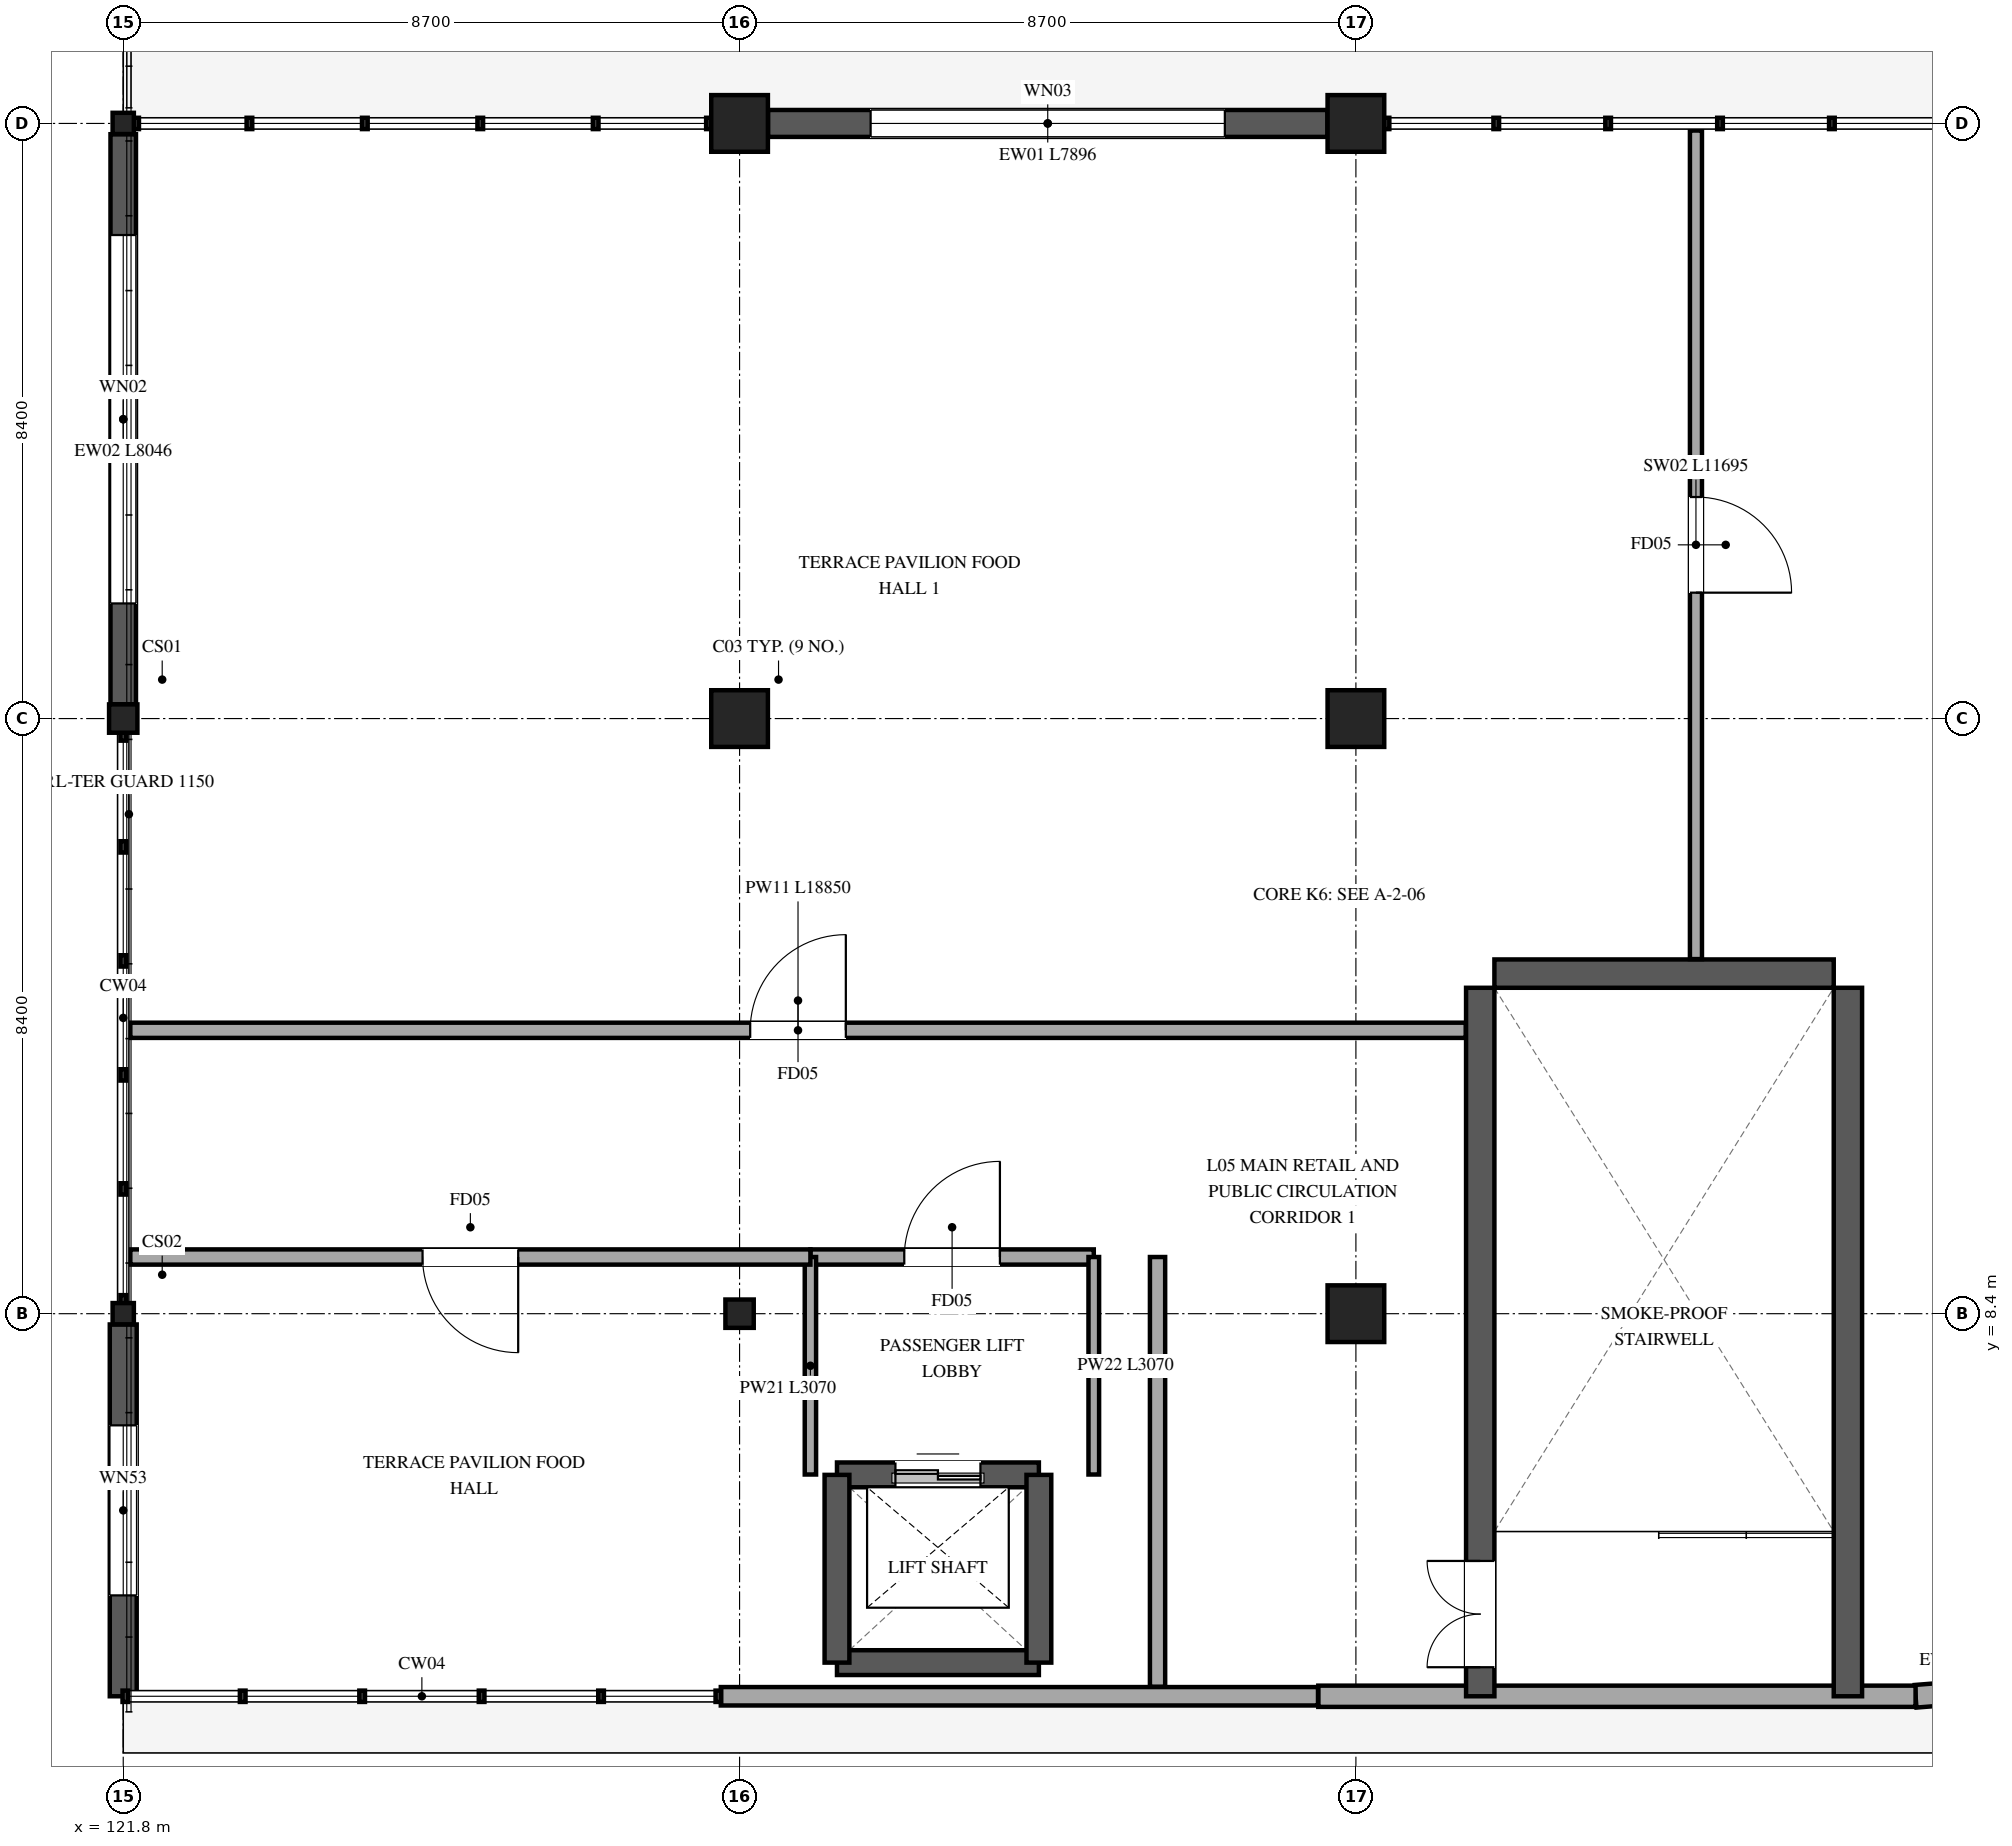
"""IFC4 building model, lengths in metres.
Left out: names, types, materials, properties, quantities, classifications, styles, units other than length and angle.
Written with IfcOpenShell. Run it as: python <this file> out.ifc"""

import sys

from ifc_helpers import new_model, si_unit, direction, frame, frame_2d, origin, origin_2d, place, context, subcontext, project, spatial, rectangle, i_section, extrude, element, fill, save


model = new_model("IFC4")
c1 = context("Model", 3, precision=1e-05, world=origin(), true_north=direction((0.0, 1.0)))
c2 = subcontext(c1, "Body", "Model", "MODEL_VIEW")
j1 = project(units=[si_unit("LENGTHUNIT", "METRE"), si_unit("PLANEANGLEUNIT", "RADIAN")], contexts=[c1])
p1 = place(None, origin())
s1 = spatial("IfcSite", under=j1, at=p1, CompositionType="ELEMENT")
p2 = place(p1, origin())
s2 = spatial("IfcBuilding", under=s1, at=p2, CompositionType="ELEMENT")
p3 = place(p2, frame((0.0, 0.0, 21.6)))
s3 = spatial("IfcBuildingStorey", under=s2, at=p3, CompositionType="ELEMENT", Elevation=21.6)
p4 = place(p3, frame((121.8, 8.4, 0.0), z_axis=(0.0, 0.0, 1.0), x_axis=(1.0, 0.0, 0.0)))
e1 = element("IfcColumn", 1, at=p4, inside=s3, PredefinedType="PILASTER", context=c2, shape_type="SweptSolid", body=[
    extrude(i_section(OverallWidth=0.3, OverallDepth=0.3, WebThickness=0.01, FlangeThickness=0.015, FilletRadius=0.018, at=origin_2d()), origin(), (0.0, 0.0, 1.0), 5.1),
])
p5 = place(p3, frame((121.8, 16.8, 0.0), z_axis=(0.0, 0.0, 1.0), x_axis=(1.0, 0.0, 0.0)))
e2 = element("IfcColumn", 2, at=p5, inside=s3, PredefinedType="COLUMN", context=c2, shape_type="SweptSolid", body=[
    extrude(i_section(OverallWidth=0.4, OverallDepth=0.4, WebThickness=0.013, FlangeThickness=0.021, FilletRadius=0.022, at=origin_2d()), origin(), (0.0, 0.0, 1.0), 5.1),
])
p6 = place(p3, frame((121.8, 25.2, 0.0), z_axis=(0.0, 0.0, 1.0), x_axis=(1.0, 0.0, 0.0)))
e3 = element("IfcColumn", 3, at=p6, inside=s3, PredefinedType="PILASTER", context=c2, shape_type="SweptSolid", body=[
    extrude(i_section(OverallWidth=0.3, OverallDepth=0.3, WebThickness=0.01, FlangeThickness=0.015, FilletRadius=0.018, at=origin_2d()), origin(), (0.0, 0.0, 1.0), 5.1),
])
p7 = place(p3, frame((130.5, 8.4, 0.0), z_axis=(0.0, 0.0, 1.0), x_axis=(1.0, 0.0, 0.0)))
e4 = element("IfcColumn", 4, at=p7, inside=s3, PredefinedType="COLUMN", context=c2, shape_type="SweptSolid", body=[
    extrude(i_section(OverallWidth=0.4, OverallDepth=0.4, WebThickness=0.013, FlangeThickness=0.021, FilletRadius=0.022, at=origin_2d()), origin(), (0.0, 0.0, 1.0), 5.1),
])
for number, where, z_axis, x_axis in (
    (5, (130.5, 16.8, 0.0), (0.0, 0.0, 1.0), (1.0, 0.0, 0.0)),
    (6, (130.5, 25.2, 0.0), (0.0, 0.0, 1.0), (1.0, 0.0, 0.0)),
    (7, (139.2, 8.4, 0.0), (0.0, 0.0, 1.0), (1.0, 0.0, 0.0)),
    (8, (139.2, 16.8, 0.0), (0.0, 0.0, 1.0), (1.0, 0.0, 0.0)),
    (9, (139.2, 25.2, 0.0), (0.0, 0.0, 1.0), (1.0, 0.0, 0.0)),
):
    element("IfcColumn", number, at=place(p3, frame(where, z_axis=z_axis, x_axis=x_axis)), inside=s3, PredefinedType="COLUMN", context=c2, shape_type="SweptSolid", body=[
        extrude(rectangle(XDim=0.8, YDim=0.8, at=origin_2d()), origin(), (0.0, 0.0, 1.0), 5.1),
    ])
p8 = place(p3, frame((148.586, 3.117, 0.0), z_axis=(0.0, 0.0, 1.0), x_axis=(-0.996917059385, -0.078462581572, 0.0)))
e10 = element("IfcWall", 10, at=p8, inside=s3, PredefinedType="STANDARD", context=c2, shape_type="SweptSolid", body=[
    extrude(rectangle(XDim=1.49, YDim=0.32, at=frame_2d((0.745, 0.0))), origin(), (0.0, 0.0, 1.0), 4.79),
])
p9 = place(p3, frame((147.1, 3.0, 0.0), z_axis=(0.0, 0.0, 1.0), x_axis=(-1.0, 0.0, 0.0)))
e11 = element("IfcWall", 11, at=p9, inside=s3, PredefinedType="STANDARD", context=c2, shape_type="SweptSolid", body=[
    extrude(rectangle(XDim=8.431, YDim=0.3, at=frame_2d((4.216, 0.0))), origin(), (0.0, 0.0, 1.0), 4.79),
])
p10 = place(p3, frame((138.665, 3.0, 0.0), z_axis=(0.0, 0.0, 1.0), x_axis=(-1.0, 0.0, 0.0)))
e12 = element("IfcWall", 12, at=p10, inside=s3, PredefinedType="STANDARD", context=c2, shape_type="SweptSolid", body=[
    extrude(rectangle(XDim=8.43, YDim=0.26, at=frame_2d((4.215, 0.0))), origin(), (0.0, 0.0, 1.0), 4.79),
])
p11 = place(p3, frame((121.8, 3.0, 0.0), z_axis=(0.0, 0.0, 1.0), x_axis=(0.0, 1.0, 0.0)))
e13 = element("IfcWall", 13, at=p11, inside=s3, PredefinedType="STANDARD", context=c2, shape_type="SweptSolid", body=[
    extrude(rectangle(XDim=5.248, YDim=0.38, at=frame_2d((2.624, 0.0))), origin(), (0.0, 0.0, 1.0), 4.79),
])
p12 = place(p11, frame((1.424, 0.0, 0.85)))
e14 = element("IfcOpeningElement", 14, at=p12, cuts=e13, PredefinedType="OPENING", context=c2, shape_type="SweptSolid", body=[
    extrude(rectangle(XDim=2.4, YDim=2.25, at=frame_2d((1.2, 1.125))), frame((0.0, 0.2, 0.0), z_axis=(0.0, -1.0, 0.0), x_axis=(1.0, 0.0, 0.0)), (0.0, 0.0, 1.0), 0.4),
])
p13 = place(p3, frame((121.8, 17.002, 0.0), z_axis=(0.0, 0.0, 1.0), x_axis=(0.0, 1.0, 0.0)))
e15 = element("IfcWall", 15, at=p13, inside=s3, PredefinedType="STANDARD", context=c2, shape_type="SweptSolid", body=[
    extrude(rectangle(XDim=8.046, YDim=0.36, at=frame_2d((4.023, 0.0))), origin(), (0.0, 0.0, 1.0), 4.79),
])
p14 = place(p13, frame((1.423, 0.0, 0.85)))
e16 = element("IfcOpeningElement", 16, at=p14, cuts=e15, PredefinedType="OPENING", context=c2, shape_type="SweptSolid", body=[
    extrude(rectangle(XDim=5.2, YDim=2.75, at=frame_2d((2.6, 1.375))), frame((0.0, 0.19, 0.0), z_axis=(0.0, -1.0, 0.0), x_axis=(1.0, 0.0, 0.0)), (0.0, 0.0, 1.0), 0.38),
])
p15 = place(p3, frame((130.902, 25.2, 0.0), z_axis=(0.0, 0.0, 1.0), x_axis=(1.0, 0.0, 0.0)))
e17 = element("IfcWall", 17, at=p15, inside=s3, PredefinedType="STANDARD", context=c2, shape_type="SweptSolid", body=[
    extrude(rectangle(XDim=7.896, YDim=0.38, at=frame_2d((3.948, 0.0))), origin(), (0.0, 0.0, 1.0), 4.79),
])
p16 = place(p15, frame((1.448, 0.0, 0.85)))
e18 = element("IfcOpeningElement", 18, at=p16, cuts=e17, PredefinedType="OPENING", context=c2, shape_type="SweptSolid", body=[
    extrude(rectangle(XDim=5.0, YDim=2.65, at=frame_2d((2.5, 1.325))), frame((0.0, 0.2, 0.0), z_axis=(0.0, -1.0, 0.0), x_axis=(1.0, 0.0, 0.0)), (0.0, 0.0, 1.0), 0.4),
])
p17 = place(p3, frame((140.955, 3.0, 0.0), z_axis=(0.0, 0.0, 1.0), x_axis=(0.0, 1.0, 0.0)))
e19 = element("IfcWall", 19, at=p17, inside=s3, PredefinedType="SHEAR", context=c2, shape_type="SweptSolid", body=[
    extrude(rectangle(XDim=10.0, YDim=0.4, at=frame_2d((5.0, 0.0))), origin(), (0.0, 0.0, 1.0), 5.1),
])
p18 = place(p17, frame((0.41, 0.0, 0.0)))
e20 = element("IfcOpeningElement", 20, at=p18, cuts=e19, PredefinedType="OPENING", context=c2, shape_type="SweptSolid", body=[
    extrude(rectangle(XDim=1.5, YDim=2.2, at=frame_2d((0.75, 1.1))), frame((0.0, 0.21, 0.0), z_axis=(0.0, -1.0, 0.0), x_axis=(1.0, 0.0, 0.0)), (0.0, 0.0, 1.0), 0.42),
])
p19 = place(p3, frame((146.145, 13.0, 0.0), z_axis=(0.0, 0.0, 1.0), x_axis=(0.0, -1.0, 0.0)))
e21 = element("IfcWall", 21, at=p19, inside=s3, PredefinedType="SHEAR", context=c2, shape_type="SweptSolid", body=[
    extrude(rectangle(XDim=10.0, YDim=0.4, at=frame_2d((5.0, 0.0))), origin(), (0.0, 0.0, 1.0), 5.1),
])
p20 = place(p3, frame((141.155, 13.2, 0.0), z_axis=(0.0, 0.0, 1.0), x_axis=(1.0, 0.0, 0.0)))
e22 = element("IfcWall", 22, at=p20, inside=s3, PredefinedType="SHEAR", context=c2, shape_type="SweptSolid", body=[
    extrude(rectangle(XDim=4.79, YDim=0.4, at=frame_2d((2.395, 0.0))), origin(), (0.0, 0.0, 1.0), 5.1),
])
p21 = place(p3, frame((131.875, 6.125, 0.0), z_axis=(0.0, 0.0, 1.0), x_axis=(1.0, 0.0, 0.0)))
e23 = element("IfcWall", 23, at=p21, inside=s3, PredefinedType="SHEAR", context=c2, shape_type="SweptSolid", body=[
    extrude(rectangle(XDim=2.85, YDim=0.35, at=frame_2d((1.425, 0.0))), origin(), (0.0, 0.0, 1.0), 5.1),
])
p22 = place(p21, frame((0.825, 0.0, 0.0)))
e24 = element("IfcOpeningElement", 24, at=p22, cuts=e23, PredefinedType="OPENING", context=c2, shape_type="SweptSolid", body=[
    extrude(rectangle(XDim=1.2, YDim=2.2, at=frame_2d((0.6, 1.1))), frame((0.0, 0.185, 0.0), z_axis=(0.0, -1.0, 0.0), x_axis=(1.0, 0.0, 0.0)), (0.0, 0.0, 1.0), 0.37),
])
p23 = place(p3, frame((134.725, 3.475, 0.0), z_axis=(0.0, 0.0, 1.0), x_axis=(-1.0, 0.0, 0.0)))
e25 = element("IfcWall", 25, at=p23, inside=s3, PredefinedType="SHEAR", context=c2, shape_type="SweptSolid", body=[
    extrude(rectangle(XDim=2.85, YDim=0.35, at=frame_2d((1.425, 0.0))), origin(), (0.0, 0.0, 1.0), 5.1),
])
for number, where, z_axis, x_axis in (
    (26, (131.875, 3.475, 0.0), (0.0, 0.0, 1.0), (0.0, 1.0, 0.0)),
    (27, (134.725, 6.125, 0.0), (0.0, 0.0, 1.0), (0.0, -1.0, 0.0)),
):
    element("IfcWall", number, at=place(p3, frame(where, z_axis=z_axis, x_axis=x_axis)), inside=s3, PredefinedType="SHEAR", context=c2, shape_type="SweptSolid", body=[
        extrude(rectangle(XDim=2.65, YDim=0.35, at=frame_2d((1.325, 0.0))), origin(), (0.0, 0.0, 1.0), 5.1),
    ])
p24 = place(p3, frame((131.5, 9.2, 0.0), z_axis=(0.0, 0.0, 1.0), x_axis=(1.0, 0.0, 0.0)))
e28 = element("IfcWall", 28, at=p24, inside=s3, PredefinedType="PARTITIONING", context=c2, shape_type="SweptSolid", body=[
    extrude(rectangle(XDim=4.0, YDim=0.215, at=frame_2d((2.0, 0.0))), origin(), (0.0, 0.0, 1.0), 4.76),
])
p25 = place(p24, frame((1.325, 0.0, 0.0)))
e29 = element("IfcOpeningElement", 29, at=p25, cuts=e28, PredefinedType="OPENING", context=c2, shape_type="SweptSolid", body=[
    extrude(rectangle(XDim=1.35, YDim=2.2, at=frame_2d((0.675, 1.1))), frame((0.0, 0.118, 0.0), z_axis=(0.0, -1.0, 0.0), x_axis=(1.0, 0.0, 0.0)), (0.0, 0.0, 1.0), 0.235),
])
p26 = place(p3, frame((131.5, 6.13, 0.0), z_axis=(0.0, 0.0, 1.0), x_axis=(0.0, 1.0, 0.0)))
e30 = element("IfcWall", 30, at=p26, inside=s3, PredefinedType="PARTITIONING", context=c2, shape_type="SweptSolid", body=[
    extrude(rectangle(XDim=3.07, YDim=0.16, at=frame_2d((1.535, 0.0))), origin(), (0.0, 0.0, 1.0), 4.06),
])
p27 = place(p3, frame((135.5, 9.2, 0.0), z_axis=(0.0, 0.0, 1.0), x_axis=(0.0, -1.0, 0.0)))
e31 = element("IfcWall", 31, at=p27, inside=s3, PredefinedType="PARTITIONING", context=c2, shape_type="SweptSolid", body=[
    extrude(rectangle(XDim=3.07, YDim=0.15, at=frame_2d((1.535, 0.0))), origin(), (0.0, 0.0, 1.0), 4.06),
])
p28 = place(p3, frame((121.9, 12.4, 0.0), z_axis=(0.0, 0.0, 1.0), x_axis=(1.0, 0.0, 0.0)))
e32 = element("IfcWall", 32, at=p28, inside=s3, PredefinedType="PARTITIONING", context=c2, shape_type="SweptSolid", body=[
    extrude(rectangle(XDim=18.85, YDim=0.215, at=frame_2d((9.425, 0.0))), origin(), (0.0, 0.0, 1.0), 4.06),
])
p29 = place(p28, frame((8.75, 0.0, 0.0)))
e33 = element("IfcOpeningElement", 33, at=p29, cuts=e32, PredefinedType="OPENING", context=c2, shape_type="SweptSolid", body=[
    extrude(rectangle(XDim=1.35, YDim=2.2, at=frame_2d((0.675, 1.1))), frame((0.0, 0.118, 0.0), z_axis=(0.0, -1.0, 0.0), x_axis=(1.0, 0.0, 0.0)), (0.0, 0.0, 1.0), 0.235),
])
p30 = place(p3, frame((131.5, 9.2, 0.0), z_axis=(0.0, 0.0, 1.0), x_axis=(-1.0, 0.0, 0.0)))
e34 = element("IfcWall", 34, at=p30, inside=s3, PredefinedType="PARTITIONING", context=c2, shape_type="SweptSolid", body=[
    extrude(rectangle(XDim=9.6, YDim=0.215, at=frame_2d((4.8, 0.0))), origin(), (0.0, 0.0, 1.0), 4.06),
])
p31 = place(p30, frame((4.125, 0.0, 0.0)))
e35 = element("IfcOpeningElement", 35, at=p31, cuts=e34, PredefinedType="OPENING", context=c2, shape_type="SweptSolid", body=[
    extrude(rectangle(XDim=1.35, YDim=2.2, at=frame_2d((0.675, 1.1))), frame((0.0, 0.118, 0.0), z_axis=(0.0, -1.0, 0.0), x_axis=(1.0, 0.0, 0.0)), (0.0, 0.0, 1.0), 0.235),
])
p32 = place(p3, frame((136.4, 3.135, 0.0), z_axis=(0.0, 0.0, 1.0), x_axis=(0.0, 1.0, 0.0)))
e36 = element("IfcWall", 36, at=p32, inside=s3, PredefinedType="PARTITIONING", context=c2, shape_type="SweptSolid", body=[
    extrude(rectangle(XDim=6.065, YDim=0.215, at=frame_2d((3.032, 0.0))), origin(), (0.0, 0.0, 1.0), 4.06),
])
p33 = place(p3, frame((144.0, 25.1, 0.0), z_axis=(0.0, 0.0, 1.0), x_axis=(0.0, -1.0, 0.0)))
e37 = element("IfcWall", 37, at=p33, inside=s3, PredefinedType="MOVABLE", context=c2, shape_type="SweptSolid", body=[
    extrude(rectangle(XDim=11.695, YDim=0.17, at=frame_2d((5.848, 0.0))), origin(), (0.0, 0.0, 1.0), 4.06),
])
p34 = place(p33, frame((5.173, 0.0, 0.0)))
e38 = element("IfcOpeningElement", 38, at=p34, cuts=e37, PredefinedType="OPENING", context=c2, shape_type="SweptSolid", body=[
    extrude(rectangle(XDim=1.35, YDim=2.2, at=frame_2d((0.675, 1.1))), frame((0.0, 0.095, 0.0), z_axis=(0.0, -1.0, 0.0), x_axis=(1.0, 0.0, 0.0)), (0.0, 0.0, 1.0), 0.19),
])
p35 = place(p12, origin())
e39 = element("IfcWindow", 39, at=p35, inside=s3, PartitioningType="TRIPLE_PANEL_VERTICAL", PredefinedType="WINDOW", context=c2, shape_type="SweptSolid", body=[
    extrude(rectangle(XDim=2.4, YDim=2.25, at=frame_2d((1.2, 1.125))), frame((0.0, 0.03, 0.0), z_axis=(0.0, -1.0, 0.0), x_axis=(1.0, 0.0, 0.0)), (0.0, 0.0, 1.0), 0.06),
])
fill(e14, e39)
p36 = place(p14, origin())
e40 = element("IfcWindow", 40, at=p36, inside=s3, PartitioningType="TRIPLE_PANEL_VERTICAL", PredefinedType="WINDOW", context=c2, shape_type="SweptSolid", body=[
    extrude(rectangle(XDim=5.2, YDim=2.75, at=frame_2d((2.6, 1.375))), frame((0.0, 0.03, 0.0), z_axis=(0.0, -1.0, 0.0), x_axis=(1.0, 0.0, 0.0)), (0.0, 0.0, 1.0), 0.06),
])
fill(e16, e40)
p37 = place(p16, origin())
e41 = element("IfcWindow", 41, at=p37, inside=s3, PartitioningType="TRIPLE_PANEL_VERTICAL", PredefinedType="WINDOW", context=c2, shape_type="SweptSolid", body=[
    extrude(rectangle(XDim=5.0, YDim=2.65, at=frame_2d((2.5, 1.325))), frame((0.0, 0.03, 0.0), z_axis=(0.0, -1.0, 0.0), x_axis=(1.0, 0.0, 0.0)), (0.0, 0.0, 1.0), 0.06),
])
fill(e18, e41)
p38 = place(p18, origin())
e42 = element("IfcDoor", 42, at=p38, inside=s3, OperationType="DOUBLE_DOOR_SINGLE_SWING", PredefinedType="DOOR", context=c2, shape_type="SweptSolid", body=[
    extrude(rectangle(XDim=1.5, YDim=2.2, at=frame_2d((0.75, 1.1))), frame((0.0, 0.025, 0.0), z_axis=(0.0, -1.0, 0.0), x_axis=(1.0, 0.0, 0.0)), (0.0, 0.0, 1.0), 0.05),
])
fill(e20, e42)
p39 = place(p22, origin())
e43 = element("IfcDoor", 43, at=p39, inside=s3, OperationType="DOUBLE_DOOR_SLIDING", PredefinedType="DOOR", context=c2, shape_type="SweptSolid", body=[
    extrude(rectangle(XDim=1.2, YDim=2.2, at=frame_2d((0.6, 1.1))), frame((0.0, 0.025, 0.0), z_axis=(0.0, -1.0, 0.0), x_axis=(1.0, 0.0, 0.0)), (0.0, 0.0, 1.0), 0.05),
])
fill(e24, e43)
p40 = place(p25, origin())
e44 = element("IfcDoor", 44, at=p40, inside=s3, OperationType="SINGLE_SWING_RIGHT", PredefinedType="DOOR", context=c2, shape_type="SweptSolid", body=[
    extrude(rectangle(XDim=1.35, YDim=2.2, at=frame_2d((0.675, 1.1))), frame((0.0, 0.025, 0.0), z_axis=(0.0, -1.0, 0.0), x_axis=(1.0, 0.0, 0.0)), (0.0, 0.0, 1.0), 0.05),
])
fill(e29, e44)
p41 = place(p29, origin())
e45 = element("IfcDoor", 45, at=p41, inside=s3, OperationType="SINGLE_SWING_RIGHT", PredefinedType="DOOR", context=c2, shape_type="SweptSolid", body=[
    extrude(rectangle(XDim=1.35, YDim=2.2, at=frame_2d((0.675, 1.1))), frame((0.0, 0.025, 0.0), z_axis=(0.0, -1.0, 0.0), x_axis=(1.0, 0.0, 0.0)), (0.0, 0.0, 1.0), 0.05),
])
fill(e33, e45)
p42 = place(p31, origin())
e46 = element("IfcDoor", 46, at=p42, inside=s3, OperationType="SINGLE_SWING_LEFT", PredefinedType="DOOR", context=c2, shape_type="SweptSolid", body=[
    extrude(rectangle(XDim=1.35, YDim=2.2, at=frame_2d((0.675, 1.1))), frame((0.0, 0.025, 0.0), z_axis=(0.0, -1.0, 0.0), x_axis=(1.0, 0.0, 0.0)), (0.0, 0.0, 1.0), 0.05),
])
fill(e35, e46)
p43 = place(p34, origin())
e47 = element("IfcDoor", 47, at=p43, inside=s3, OperationType="SINGLE_SWING_RIGHT", PredefinedType="DOOR", context=c2, shape_type="SweptSolid", body=[
    extrude(rectangle(XDim=1.35, YDim=2.2, at=frame_2d((0.675, 1.1))), frame((0.0, 0.025, 0.0), z_axis=(0.0, -1.0, 0.0), x_axis=(1.0, 0.0, 0.0)), (0.0, 0.0, 1.0), 0.05),
])
fill(e38, e47)
save(model, sys.argv[1])
